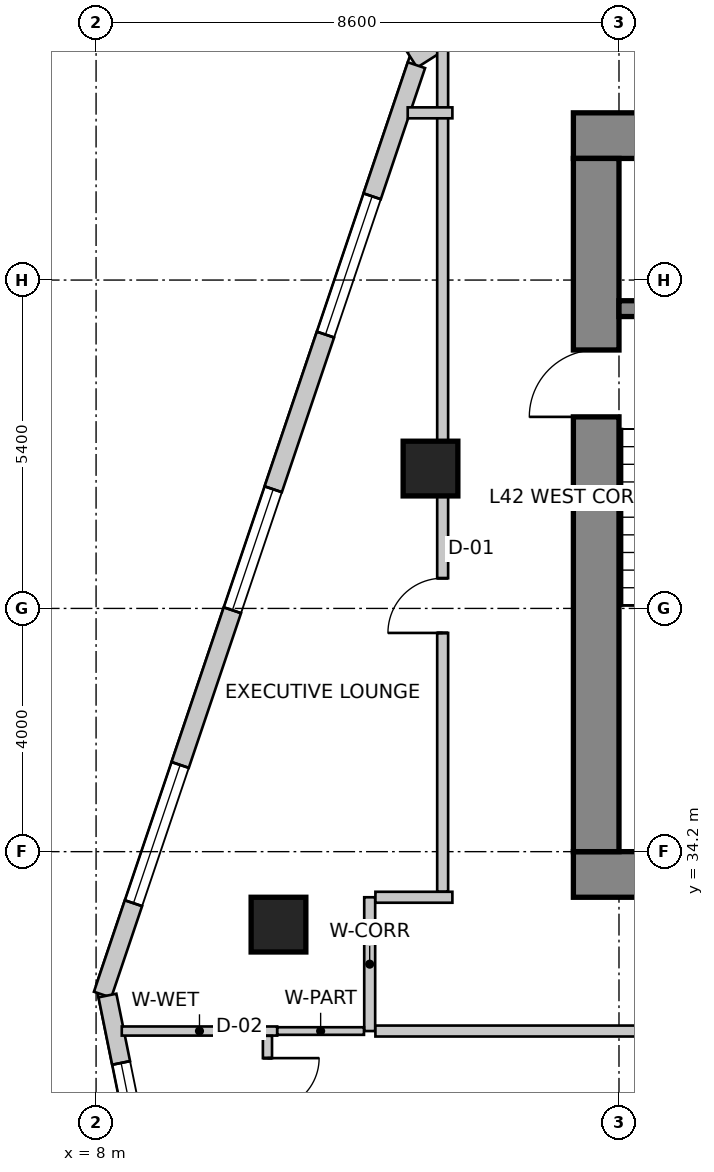
"""IFC4 building model, lengths in metres.
Left out: names, types, materials, properties, quantities, classifications, styles, units other than length and angle.
Written with IfcOpenShell. Run it as: python <this file> out.ifc"""

import sys

from ifc_helpers import new_model, si_unit, direction, frame, frame_2d, origin, origin_2d, place, context, subcontext, project, spatial, rectangle, extrude, source, transform, mapped, element, fill, save


model = new_model("IFC4")
c1 = context("Model", 3, precision=1e-05, world=origin(), true_north=direction((0.0, 1.0)))
c2 = subcontext(c1, "Body", "Model", "MODEL_VIEW")
j1 = project(units=[si_unit("LENGTHUNIT", "METRE"), si_unit("PLANEANGLEUNIT", "RADIAN")], contexts=[c1])
p1 = place(None, origin())
s1 = spatial("IfcSite", under=j1, at=p1, CompositionType="ELEMENT")
p2 = place(p1, origin())
s2 = spatial("IfcBuilding", under=s1, at=p2, CompositionType="ELEMENT")
p3 = place(p2, frame((0.0, 0.0, 168.2)))
s3 = spatial("IfcBuildingStorey", under=s2, at=p3, CompositionType="ELEMENT", Elevation=168.2)
p4 = place(p3, frame((15.85, 45.975, 0.0), z_axis=(0.0, 0.0, 1.0), x_axis=(1.0, 0.0, 0.0)))
e1 = element("IfcWall", 1, at=p4, inside=s3, PredefinedType="SHEAR", context=c2, shape_type="SweptSolid", body=[
    extrude(rectangle(XDim=15.9, YDim=0.75, at=frame_2d((7.95, 0.0))), origin(), (0.0, 0.0, 1.0), 3.6),
])
p5 = place(p3, frame((15.85, 33.825, 0.0), z_axis=(0.0, 0.0, 1.0), x_axis=(1.0, 0.0, 0.0)))
e2 = element("IfcWall", 2, at=p5, inside=s3, PredefinedType="SHEAR", context=c2, shape_type="SweptSolid", body=[
    extrude(rectangle(XDim=15.9, YDim=0.75, at=frame_2d((7.95, 0.0))), origin(), (0.0, 0.0, 1.0), 3.6),
])
m1 = source(origin(), c2, "Body", "SweptSolid", [
    extrude(rectangle(XDim=1.3, YDim=2.15, at=frame_2d((0.65, 1.075))), frame((0.0, 0.385, 0.0), z_axis=(0.0, -1.0, 0.0), x_axis=(1.0, 0.0, 0.0)), (0.0, 0.0, 1.0), 0.77),
])
p6 = place(p5, frame((10.08, 0.0, 0.0)))
e3 = element("IfcOpeningElement", 3, at=p6, cuts=e2, PredefinedType="OPENING", context=c2, shape_type="MappedRepresentation", body=[
    mapped(m1, transform((0.0, 0.0, 0.0), scale=1.0)),
])
p7 = place(p3, frame((16.225, 34.2, 0.0), z_axis=(0.0, 0.0, 1.0), x_axis=(0.0, 1.0, 0.0)))
e4 = element("IfcWall", 4, at=p7, inside=s3, PredefinedType="SHEAR", context=c2, shape_type="SweptSolid", body=[
    extrude(rectangle(XDim=11.4, YDim=0.75, at=frame_2d((5.7, 0.0))), origin(), (0.0, 0.0, 1.0), 3.6),
])
m2 = source(origin(), c2, "Body", "SweptSolid", [
    extrude(rectangle(XDim=1.1, YDim=2.15, at=frame_2d((0.55, 1.075))), frame((0.0, 0.385, 0.0), z_axis=(0.0, -1.0, 0.0), x_axis=(1.0, 0.0, 0.0)), (0.0, 0.0, 1.0), 0.77),
])
p8 = place(p7, frame((7.15, 0.0, 0.0)))
e5 = element("IfcOpeningElement", 5, at=p8, cuts=e4, PredefinedType="OPENING", context=c2, shape_type="MappedRepresentation", body=[
    mapped(m2, transform((0.0, 0.0, 0.0), scale=1.0)),
])
p9 = place(p3, frame((16.6, 43.13, 0.0), z_axis=(0.0, 0.0, 1.0), x_axis=(1.0, 0.0, 0.0)))
e6 = element("IfcWall", 6, at=p9, inside=s3, PredefinedType="SHEAR", context=c2, shape_type="SweptSolid", body=[
    extrude(rectangle(XDim=3.5, YDim=0.26, at=frame_2d((1.75, 0.0))), origin(), (0.0, 0.0, 1.0), 3.6),
])
m3 = source(origin(), c2, "Body", "SweptSolid", [
    extrude(rectangle(XDim=0.9, YDim=0.9, at=origin_2d()), origin(), (0.0, 0.0, 1.0), 3.6),
])
for number, where, z_axis, x_axis in (
    (7, (11.0, 33.0, 0.0), (0.0, 0.0, 1.0), (1.0, 0.0, 0.0)),
    (8, (13.5, 40.5, 0.0), (0.0, 0.0, 1.0), (1.0, 0.0, 0.0)),
):
    element("IfcColumn", number, at=place(p3, frame(where, z_axis=z_axis, x_axis=x_axis)), inside=s3, PredefinedType="COLUMN", context=c2, shape_type="MappedRepresentation", body=[
        mapped(m3, transform((0.0, 0.0, 0.0), scale=1.0)),
    ])
p10 = place(p3, frame((21.875, 52.742, 0.0), z_axis=(0.0, 0.0, 1.0), x_axis=(-0.843662465249, -0.536873956092, 0.0)))
e9 = element("IfcWall", 9, at=p10, inside=s3, PredefinedType="SOLIDWALL", context=c2, shape_type="SweptSolid", body=[
    extrude(rectangle(XDim=10.284, YDim=0.3, at=frame_2d((5.142, 0.0))), origin(), (0.0, 0.0, 1.0), 3.3),
])
m4 = source(origin(), c2, "Body", "SweptSolid", [
    extrude(rectangle(XDim=2.1, YDim=2.0, at=frame_2d((1.05, 1.0))), frame((0.0, 0.16, 0.0), z_axis=(0.0, -1.0, 0.0), x_axis=(1.0, 0.0, 0.0)), (0.0, 0.0, 1.0), 0.32),
])
p11 = place(p10, frame((2.806, 0.0, 0.85)))
e10 = element("IfcOpeningElement", 10, at=p11, cuts=e9, PredefinedType="OPENING", context=c2, shape_type="MappedRepresentation", body=[
    mapped(m4, transform((0.0, 0.0, 0.0), scale=1.0)),
])
m5 = source(origin(), c2, "Body", "SweptSolid", [
    extrude(rectangle(XDim=1.2, YDim=1.6, at=frame_2d((0.6, 0.8))), frame((0.0, 0.16, 0.0), z_axis=(0.0, -1.0, 0.0), x_axis=(1.0, 0.0, 0.0)), (0.0, 0.0, 1.0), 0.32),
])
p12 = place(p10, frame((8.087, 0.0, 0.85)))
e11 = element("IfcOpeningElement", 11, at=p12, cuts=e9, PredefinedType="OPENING", context=c2, shape_type="MappedRepresentation", body=[
    mapped(m5, transform((0.0, 0.0, 0.0), scale=1.0)),
])
p13 = place(p3, frame((13.269, 47.134, 0.0), z_axis=(0.0, 0.0, 1.0), x_axis=(-0.319929773322, -0.947441259468, 0.0)))
e12 = element("IfcWall", 12, at=p13, inside=s3, PredefinedType="SOLIDWALL", context=c2, shape_type="SweptSolid", body=[
    extrude(rectangle(XDim=16.134, YDim=0.3, at=frame_2d((8.067, 0.0))), origin(), (0.0, 0.0, 1.0), 3.3),
])
m6 = source(origin(), c2, "Body", "SweptSolid", [
    extrude(rectangle(XDim=2.4, YDim=2.2, at=frame_2d((1.2, 1.1))), frame((0.0, 0.16, 0.0), z_axis=(0.0, -1.0, 0.0), x_axis=(1.0, 0.0, 0.0)), (0.0, 0.0, 1.0), 0.32),
])
p14 = place(p13, frame((2.276, 0.0, 0.85)))
e13 = element("IfcOpeningElement", 13, at=p14, cuts=e12, PredefinedType="OPENING", context=c2, shape_type="MappedRepresentation", body=[
    mapped(m6, transform((0.0, 0.0, 0.0), scale=1.0)),
])
p15 = place(p13, frame((7.361, 0.0, 0.85)))
e14 = element("IfcOpeningElement", 14, at=p15, cuts=e12, PredefinedType="OPENING", context=c2, shape_type="MappedRepresentation", body=[
    mapped(m4, transform((0.0, 0.0, 0.0), scale=1.0)),
])
p16 = place(p13, frame((12.146, 0.0, 0.85)))
e15 = element("IfcOpeningElement", 15, at=p16, cuts=e12, PredefinedType="OPENING", context=c2, shape_type="MappedRepresentation", body=[
    mapped(m6, transform((0.0, 0.0, 0.0), scale=1.0)),
])
p17 = place(p3, frame((8.187, 31.834, 0.0), z_axis=(0.0, 0.0, 1.0), x_axis=(0.198869838988, -0.980025911464, 0.0)))
e16 = element("IfcWall", 16, at=p17, inside=s3, PredefinedType="SOLIDWALL", context=c2, shape_type="SweptSolid", body=[
    extrude(rectangle(XDim=16.363, YDim=0.3, at=frame_2d((8.182, 0.0))), origin(), (0.0, 0.0, 1.0), 3.3),
])
p18 = place(p17, frame((1.131, 0.0, 0.85)))
e17 = element("IfcOpeningElement", 17, at=p18, cuts=e16, PredefinedType="OPENING", context=c2, shape_type="MappedRepresentation", body=[
    mapped(m5, transform((0.0, 0.0, 0.0), scale=1.0)),
])
p19 = place(p17, frame((4.345, 0.0, 0.85)))
e18 = element("IfcOpeningElement", 18, at=p19, cuts=e16, PredefinedType="OPENING", context=c2, shape_type="MappedRepresentation", body=[
    mapped(m4, transform((0.0, 0.0, 0.0), scale=1.0)),
])
p20 = place(p17, frame((8.857, 0.0, 0.85)))
e19 = element("IfcOpeningElement", 19, at=p20, cuts=e16, PredefinedType="OPENING", context=c2, shape_type="MappedRepresentation", body=[
    mapped(m6, transform((0.0, 0.0, 0.0), scale=1.0)),
])
p21 = place(p17, frame((13.386, 0.0, 0.85)))
e20 = element("IfcOpeningElement", 20, at=p21, cuts=e16, PredefinedType="OPENING", context=c2, shape_type="MappedRepresentation", body=[
    mapped(m4, transform((0.0, 0.0, 0.0), scale=1.0)),
])
p22 = place(p3, frame((12.5, 31.25, 0.0), z_axis=(0.0, 0.0, 1.0), x_axis=(0.0, 1.0, 0.0)))
e21 = element("IfcWall", 21, at=p22, inside=s3, PredefinedType="PARTITIONING", context=c2, shape_type="SweptSolid", body=[
    extrude(rectangle(XDim=2.2, YDim=0.18, at=frame_2d((1.1, 0.0))), origin(), (0.0, 0.0, 1.0), 2.885),
])
p23 = place(p3, frame((12.594, 33.45, 0.0), z_axis=(0.0, 0.0, 1.0), x_axis=(1.0, 0.0, 0.0)))
e22 = element("IfcWall", 22, at=p23, inside=s3, PredefinedType="PARTITIONING", context=c2, shape_type="SweptSolid", body=[
    extrude(rectangle(XDim=1.266, YDim=0.18, at=frame_2d((0.633, 0.0))), origin(), (0.0, 0.0, 1.0), 3.3),
])
p24 = place(p3, frame((17.96, 31.25, 0.0), z_axis=(0.0, 0.0, 1.0), x_axis=(-1.0, 0.0, 0.0)))
e23 = element("IfcWall", 23, at=p24, inside=s3, PredefinedType="PARTITIONING", context=c2, shape_type="SweptSolid", body=[
    extrude(rectangle(XDim=5.366, YDim=0.18, at=frame_2d((2.683, 0.0))), origin(), (0.0, 0.0, 1.0), 2.885),
])
p25 = place(p3, frame((13.7, 33.544, 0.0), z_axis=(0.0, 0.0, 1.0), x_axis=(0.0, 1.0, 0.0)))
e24 = element("IfcWall", 24, at=p25, inside=s3, PredefinedType="PARTITIONING", context=c2, shape_type="SweptSolid", body=[
    extrude(rectangle(XDim=13.86, YDim=0.18, at=frame_2d((6.93, 0.0))), origin(), (0.0, 0.0, 1.0), 2.442),
])
m7 = source(origin(), c2, "Body", "SweptSolid", [
    extrude(rectangle(XDim=0.9, YDim=2.15, at=frame_2d((0.45, 1.075))), frame((0.0, 0.1, 0.0), z_axis=(0.0, -1.0, 0.0), x_axis=(1.0, 0.0, 0.0)), (0.0, 0.0, 1.0), 0.2),
])
p26 = place(p25, frame((4.253, 0.0, 0.0)))
e25 = element("IfcOpeningElement", 25, at=p26, cuts=e24, PredefinedType="OPENING", context=c2, shape_type="MappedRepresentation", body=[
    mapped(m7, transform((0.0, 0.0, 0.0), scale=1.0)),
])
p27 = place(p3, frame((13.86, 46.35, 0.0), z_axis=(0.0, 0.0, 1.0), x_axis=(-1.0, 0.0, 0.0)))
e26 = element("IfcWall", 26, at=p27, inside=s3, PredefinedType="PARTITIONING", context=c2, shape_type="SweptSolid", body=[
    extrude(rectangle(XDim=0.735, YDim=0.18, at=frame_2d((0.367, 0.0))), origin(), (0.0, 0.0, 1.0), 3.3),
])
p28 = place(p3, frame((10.979, 31.25, 0.0), z_axis=(0.0, 0.0, 1.0), x_axis=(-1.0, 0.0, 0.0)))
e27 = element("IfcWall", 27, at=p28, inside=s3, PredefinedType="PARTITIONING", context=c2, shape_type="SweptSolid", body=[
    extrude(rectangle(XDim=2.556, YDim=0.15, at=frame_2d((1.278, 0.0))), origin(), (0.0, 0.0, 1.0), 2.442),
])
p29 = place(p3, frame((12.406, 31.25, 0.0), z_axis=(0.0, 0.0, 1.0), x_axis=(-1.0, 0.0, 0.0)))
e28 = element("IfcWall", 28, at=p29, inside=s3, PredefinedType="PARTITIONING", context=c2, shape_type="SweptSolid", body=[
    extrude(rectangle(XDim=1.426, YDim=0.125, at=frame_2d((0.713, 0.0))), origin(), (0.0, 0.0, 1.0), 2.442),
])
p30 = place(p3, frame((10.819, 31.171, 0.0), z_axis=(0.0, 0.0, 1.0), x_axis=(0.0, -1.0, 0.0)))
e29 = element("IfcWall", 29, at=p30, inside=s3, PredefinedType="PARTITIONING", context=c2, shape_type="SweptSolid", body=[
    extrude(rectangle(XDim=2.101, YDim=0.15, at=frame_2d((1.05, 0.0))), origin(), (0.0, 0.0, 1.0), 2.442),
])
m8 = source(origin(), c2, "Body", "SweptSolid", [
    extrude(rectangle(XDim=0.85, YDim=2.15, at=frame_2d((0.425, 1.075))), frame((0.0, 0.085, 0.0), z_axis=(0.0, -1.0, 0.0), x_axis=(1.0, 0.0, 0.0)), (0.0, 0.0, 1.0), 0.17),
])
p31 = place(p30, frame((0.366, 0.0, 0.0)))
e30 = element("IfcOpeningElement", 30, at=p31, cuts=e29, PredefinedType="OPENING", context=c2, shape_type="MappedRepresentation", body=[
    mapped(m8, transform((0.0, 0.0, 0.0), scale=1.0)),
])
m9 = source(origin(), c2, "Body", "SweptSolid", [
    extrude(rectangle(XDim=2.4, YDim=2.2, at=frame_2d((1.2, 1.1))), frame((0.0, -0.015, 0.0), z_axis=(0.0, -1.0, 0.0), x_axis=(1.0, 0.0, 0.0)), (0.0, 0.0, 1.0), 0.06),
])
p32 = place(p14, origin())
e31 = element("IfcWindow", 31, at=p32, inside=s3, PartitioningType="SINGLE_PANEL", PredefinedType="WINDOW", context=c2, shape_type="MappedRepresentation", body=[
    mapped(m9, transform((0.0, 0.0, 0.0), scale=1.0)),
])
fill(e13, e31)
m10 = source(origin(), c2, "Body", "SweptSolid", [
    extrude(rectangle(XDim=2.1, YDim=2.0, at=frame_2d((1.05, 1.0))), frame((0.0, -0.015, 0.0), z_axis=(0.0, -1.0, 0.0), x_axis=(1.0, 0.0, 0.0)), (0.0, 0.0, 1.0), 0.06),
])
p33 = place(p15, origin())
e32 = element("IfcWindow", 32, at=p33, inside=s3, PartitioningType="SINGLE_PANEL", PredefinedType="WINDOW", context=c2, shape_type="MappedRepresentation", body=[
    mapped(m10, transform((0.0, 0.0, 0.0), scale=1.0)),
])
fill(e14, e32)
p34 = place(p16, origin())
e33 = element("IfcWindow", 33, at=p34, inside=s3, PartitioningType="SINGLE_PANEL", PredefinedType="WINDOW", context=c2, shape_type="MappedRepresentation", body=[
    mapped(m9, transform((0.0, 0.0, 0.0), scale=1.0)),
])
fill(e15, e33)
m11 = source(origin(), c2, "Body", "SweptSolid", [
    extrude(rectangle(XDim=1.2, YDim=1.6, at=frame_2d((0.6, 0.8))), frame((0.0, -0.015, 0.0), z_axis=(0.0, -1.0, 0.0), x_axis=(1.0, 0.0, 0.0)), (0.0, 0.0, 1.0), 0.06),
])
p35 = place(p18, origin())
e34 = element("IfcWindow", 34, at=p35, inside=s3, PartitioningType="SINGLE_PANEL", PredefinedType="WINDOW", context=c2, shape_type="MappedRepresentation", body=[
    mapped(m11, transform((0.0, 0.0, 0.0), scale=1.0)),
])
fill(e17, e34)
m12 = source(origin(), c2, "Body", "SweptSolid", [
    extrude(rectangle(XDim=1.1, YDim=2.15, at=frame_2d((0.55, 1.075))), frame((0.0, 0.025, 0.0), z_axis=(0.0, -1.0, 0.0), x_axis=(1.0, 0.0, 0.0)), (0.0, 0.0, 1.0), 0.05),
])
p36 = place(p8, origin())
e35 = element("IfcDoor", 35, at=p36, inside=s3, OperationType="SINGLE_SWING_LEFT", PredefinedType="DOOR", context=c2, shape_type="MappedRepresentation", body=[
    mapped(m12, transform((0.0, 0.0, 0.0), scale=1.0)),
])
fill(e5, e35)
m13 = source(origin(), c2, "Body", "SweptSolid", [
    extrude(rectangle(XDim=0.9, YDim=2.15, at=frame_2d((0.45, 1.075))), frame((0.0, 0.025, 0.0), z_axis=(0.0, -1.0, 0.0), x_axis=(1.0, 0.0, 0.0)), (0.0, 0.0, 1.0), 0.05),
])
p37 = place(p26, origin())
e36 = element("IfcDoor", 36, at=p37, inside=s3, OperationType="SINGLE_SWING_LEFT", PredefinedType="DOOR", context=c2, shape_type="MappedRepresentation", body=[
    mapped(m13, transform((0.0, 0.0, 0.0), scale=1.0)),
])
fill(e25, e36)
m14 = source(origin(), c2, "Body", "SweptSolid", [
    extrude(rectangle(XDim=0.85, YDim=2.15, at=frame_2d((0.425, 1.075))), frame((0.0, 0.025, 0.0), z_axis=(0.0, -1.0, 0.0), x_axis=(1.0, 0.0, 0.0)), (0.0, 0.0, 1.0), 0.05),
])
p38 = place(p31, origin())
e37 = element("IfcDoor", 37, at=p38, inside=s3, OperationType="SINGLE_SWING_LEFT", PredefinedType="DOOR", context=c2, shape_type="MappedRepresentation", body=[
    mapped(m14, transform((0.0, 0.0, 0.0), scale=1.0)),
])
fill(e30, e37)
save(model, sys.argv[1])
